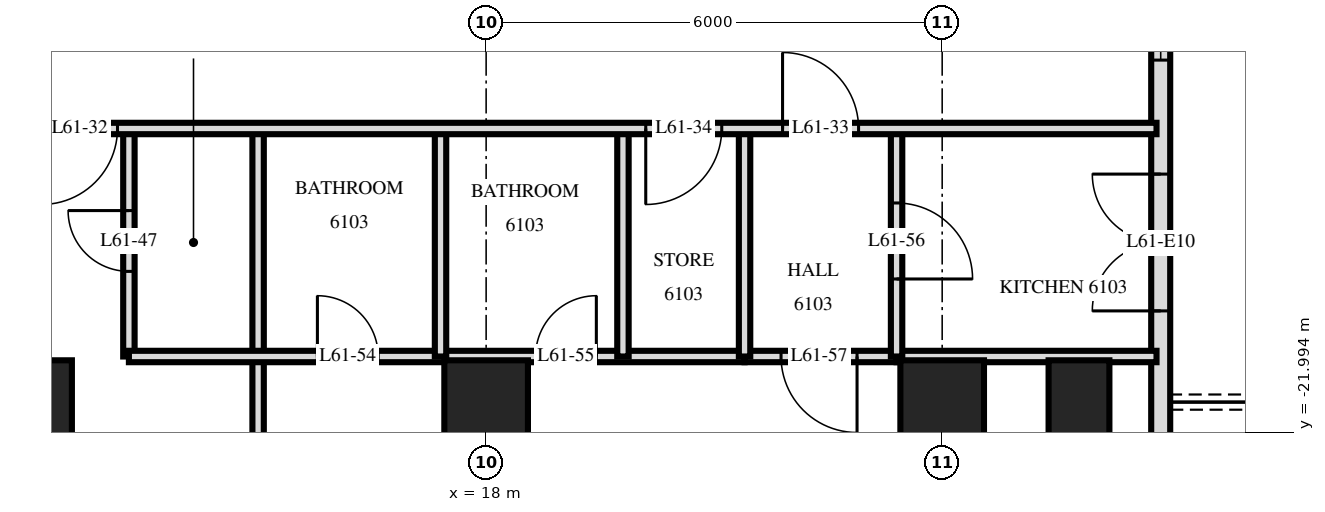
"""IFC4 building model, lengths in metres.
Left out: names, types, materials, properties, quantities, classifications, styles, units other than length and angle.
Written with IfcOpenShell. Run it as: python <this file> out.ifc"""

import sys

from ifc_helpers import new_model, si_unit, direction, frame, frame_2d, origin, origin_2d, place, context, subcontext, project, spatial, rectangle, extrude, element, fill, save


model = new_model("IFC4")
c1 = context("Model", 3, precision=1e-05, world=origin(), true_north=direction((0.0, 1.0)))
c2 = subcontext(c1, "Body", "Model", "MODEL_VIEW")
j1 = project(units=[si_unit("LENGTHUNIT", "METRE"), si_unit("PLANEANGLEUNIT", "RADIAN")], contexts=[c1])
p1 = place(None, origin())
s1 = spatial("IfcSite", under=j1, at=p1, CompositionType="ELEMENT")
p2 = place(p1, origin())
s2 = spatial("IfcBuilding", under=s1, at=p2, CompositionType="ELEMENT")
p3 = place(p2, frame((0.0, 0.0, 232.6)))
s3 = spatial("IfcBuildingStorey", under=s2, at=p3, CompositionType="ELEMENT", Elevation=232.6)
for number, where, z_axis, x_axis in (
    (1, (12.0, -21.6, 0.0), (0.0, 0.0, 1.0), (1.0, 0.0, 0.0)),
    (2, (18.0, -21.6, 0.0), (0.0, 0.0, 1.0), (1.0, 0.0, 0.0)),
    (3, (24.0, -21.6, 0.0), (0.0, 0.0, 1.0), (1.0, 0.0, 0.0)),
):
    element("IfcColumn", number, at=place(p3, frame(where, z_axis=z_axis, x_axis=x_axis)), inside=s3, PredefinedType="COLUMN", context=c2, shape_type="SweptSolid", body=[
        extrude(rectangle(XDim=1.1, YDim=1.1, at=origin_2d()), origin(), (0.0, 0.0, 1.0), 3.5),
    ])
p4 = place(p3, frame((25.8, -21.6, 0.0), z_axis=(0.0, 0.0, 1.0), x_axis=(0.0, 1.0, 0.0)))
e4 = element("IfcColumn", 4, at=p4, inside=s3, PredefinedType="COLUMN", context=c2, shape_type="SweptSolid", body=[
    extrude(rectangle(XDim=1.1, YDim=0.8, at=origin_2d()), origin(), (0.0, 0.0, 1.0), 3.5),
])
p5 = place(p3, frame((26.875, -24.875, 0.0), z_axis=(0.0, 0.0, 1.0), x_axis=(0.0, 1.0, 0.0)))
e5 = element("IfcWall", 5, at=p5, inside=s3, PredefinedType="SOLIDWALL", context=c2, shape_type="SweptSolid", body=[
    extrude(rectangle(XDim=21.551, YDim=0.25, at=frame_2d((10.775, 0.0))), origin(), (0.0, 0.0, 1.0), 3.22),
])
p6 = place(p5, frame((0.575, 0.0, 0.0)))
e6 = element("IfcOpeningElement", 6, at=p6, cuts=e5, PredefinedType="OPENING", context=c2, shape_type="SweptSolid", body=[
    extrude(rectangle(XDim=1.8, YDim=2.4, at=frame_2d((0.9, 1.2))), frame((0.0, 0.135, 0.0), z_axis=(0.0, -1.0, 0.0), x_axis=(1.0, 0.0, 0.0)), (0.0, 0.0, 1.0), 0.27),
])
p7 = place(p5, frame((4.475, 0.0, 0.0)))
e7 = element("IfcOpeningElement", 7, at=p7, cuts=e5, PredefinedType="OPENING", context=c2, shape_type="SweptSolid", body=[
    extrude(rectangle(XDim=1.8, YDim=2.4, at=frame_2d((0.9, 1.2))), frame((0.0, 0.135, 0.0), z_axis=(0.0, -1.0, 0.0), x_axis=(1.0, 0.0, 0.0)), (0.0, 0.0, 1.0), 0.27),
])
p8 = place(p5, frame((7.775, 0.0, 0.9)))
e8 = element("IfcOpeningElement", 8, at=p8, cuts=e5, PredefinedType="OPENING", context=c2, shape_type="SweptSolid", body=[
    extrude(rectangle(XDim=1.2, YDim=1.5, at=frame_2d((0.6, 0.75))), frame((0.0, 0.135, 0.0), z_axis=(0.0, -1.0, 0.0), x_axis=(1.0, 0.0, 0.0)), (0.0, 0.0, 1.0), 0.27),
])
p9 = place(p5, frame((13.1, 0.0, 0.0)))
e9 = element("IfcOpeningElement", 9, at=p9, cuts=e5, PredefinedType="OPENING", context=c2, shape_type="SweptSolid", body=[
    extrude(rectangle(XDim=1.8, YDim=2.4, at=frame_2d((0.9, 1.2))), frame((0.0, 0.135, 0.0), z_axis=(0.0, -1.0, 0.0), x_axis=(1.0, 0.0, 0.0)), (0.0, 0.0, 1.0), 0.27),
])
p10 = place(p3, frame((24.0, -28.918, 0.0), z_axis=(0.0, 0.0, 1.0), x_axis=(0.0, 1.0, 0.0)))
e10 = element("IfcWall", 10, at=p10, inside=s3, PredefinedType="PARTITIONING", context=c2, shape_type="SweptSolid", body=[
    extrude(rectangle(XDim=7.918, YDim=0.15, at=frame_2d((3.959, 0.0))), origin(), (0.0, 0.0, 1.0), 3.22),
])
p11 = place(p10, frame((3.398, 0.0, 0.0)))
e11 = element("IfcOpeningElement", 11, at=p11, cuts=e10, PredefinedType="OPENING", context=c2, shape_type="SweptSolid", body=[
    extrude(rectangle(XDim=0.9, YDim=2.1, at=frame_2d((0.45, 1.05))), frame((0.0, 0.085, 0.0), z_axis=(0.0, -1.0, 0.0), x_axis=(1.0, 0.0, 0.0)), (0.0, 0.0, 1.0), 0.17),
])
p12 = place(p3, frame((23.4, -21.0, 0.0), z_axis=(0.0, 0.0, 1.0), x_axis=(0.0, 1.0, 0.0)))
e12 = element("IfcWall", 12, at=p12, inside=s3, PredefinedType="PARTITIONING", context=c2, shape_type="SweptSolid", body=[
    extrude(rectangle(XDim=3.0, YDim=0.15, at=frame_2d((1.5, 0.0))), origin(), (0.0, 0.0, 1.0), 3.22),
])
p13 = place(p12, frame((1.02, 0.0, 0.0)))
e13 = element("IfcOpeningElement", 13, at=p13, cuts=e12, PredefinedType="OPENING", context=c2, shape_type="SweptSolid", body=[
    extrude(rectangle(XDim=1.0, YDim=2.1, at=frame_2d((0.5, 1.05))), frame((0.0, 0.085, 0.0), z_axis=(0.0, -1.0, 0.0), x_axis=(1.0, 0.0, 0.0)), (0.0, 0.0, 1.0), 0.17),
])
for number, where, z_axis, x_axis in (
    (14, (21.4, -21.0, 0.0), (0.0, 0.0, 1.0), (0.0, 1.0, 0.0)),
    (15, (19.8, -21.0, 0.0), (0.0, 0.0, 1.0), (0.0, 1.0, 0.0)),
):
    element("IfcWall", number, at=place(p3, frame(where, z_axis=z_axis, x_axis=x_axis)), inside=s3, PredefinedType="PARTITIONING", context=c2, shape_type="SweptSolid", body=[
        extrude(rectangle(XDim=3.0, YDim=0.15, at=frame_2d((1.5, 0.0))), origin(), (0.0, 0.0, 1.0), 3.22),
    ])
p14 = place(p3, frame((18.0, -29.22, 0.0), z_axis=(0.0, 0.0, 1.0), x_axis=(0.0, 1.0, 0.0)))
e16 = element("IfcWall", 16, at=p14, inside=s3, PredefinedType="PARTITIONING", context=c2, shape_type="SweptSolid", body=[
    extrude(rectangle(XDim=8.22, YDim=0.15, at=frame_2d((4.11, 0.0))), origin(), (0.0, 0.0, 1.0), 3.22),
])
p15 = place(p14, frame((3.59, 0.0, 0.0)))
e17 = element("IfcOpeningElement", 17, at=p15, cuts=e16, PredefinedType="OPENING", context=c2, shape_type="SweptSolid", body=[
    extrude(rectangle(XDim=0.9, YDim=2.1, at=frame_2d((0.45, 1.05))), frame((0.0, 0.085, 0.0), z_axis=(0.0, -1.0, 0.0), x_axis=(1.0, 0.0, 0.0)), (0.0, 0.0, 1.0), 0.17),
])
p16 = place(p3, frame((17.4, -21.0, 0.0), z_axis=(0.0, 0.0, 1.0), x_axis=(0.0, 1.0, 0.0)))
e18 = element("IfcWall", 18, at=p16, inside=s3, PredefinedType="PARTITIONING", context=c2, shape_type="SweptSolid", body=[
    extrude(rectangle(XDim=3.0, YDim=0.15, at=frame_2d((1.5, 0.0))), origin(), (0.0, 0.0, 1.0), 3.22),
])
p17 = place(p3, frame((15.0, -29.22, 0.0), z_axis=(0.0, 0.0, 1.0), x_axis=(0.0, 1.0, 0.0)))
e19 = element("IfcWall", 19, at=p17, inside=s3, PredefinedType="PARTITIONING", context=c2, shape_type="SweptSolid", body=[
    extrude(rectangle(XDim=11.22, YDim=0.15, at=frame_2d((5.61, 0.0))), origin(), (0.0, 0.0, 1.0), 3.22),
])
p18 = place(p3, frame((13.3, -21.0, 0.0), z_axis=(0.0, 0.0, 1.0), x_axis=(0.0, 1.0, 0.0)))
e20 = element("IfcWall", 20, at=p18, inside=s3, PredefinedType="PARTITIONING", context=c2, shape_type="SweptSolid", body=[
    extrude(rectangle(XDim=3.0, YDim=0.15, at=frame_2d((1.5, 0.0))), origin(), (0.0, 0.0, 1.0), 3.22),
])
p19 = place(p18, frame((1.12, 0.0, 0.0)))
e21 = element("IfcOpeningElement", 21, at=p19, cuts=e20, PredefinedType="OPENING", context=c2, shape_type="SweptSolid", body=[
    extrude(rectangle(XDim=0.8, YDim=2.1, at=frame_2d((0.4, 1.05))), frame((0.0, 0.085, 0.0), z_axis=(0.0, -1.0, 0.0), x_axis=(1.0, 0.0, 0.0)), (0.0, 0.0, 1.0), 0.17),
])
p20 = place(p3, frame((21.4, -21.0, 0.0), z_axis=(0.0, 0.0, 1.0), x_axis=(1.0, 0.0, 0.0)))
e22 = element("IfcWall", 22, at=p20, inside=s3, PredefinedType="PARTITIONING", context=c2, shape_type="SweptSolid", body=[
    extrude(rectangle(XDim=2.0, YDim=0.15, at=frame_2d((1.0, 0.0))), origin(), (0.0, 0.0, 1.0), 3.22),
])
p21 = place(p20, frame((0.48, 0.0, 0.0)))
e23 = element("IfcOpeningElement", 23, at=p21, cuts=e22, PredefinedType="OPENING", context=c2, shape_type="SweptSolid", body=[
    extrude(rectangle(XDim=1.0, YDim=2.1, at=frame_2d((0.5, 1.05))), frame((0.0, 0.085, 0.0), z_axis=(0.0, -1.0, 0.0), x_axis=(1.0, 0.0, 0.0)), (0.0, 0.0, 1.0), 0.17),
])
p22 = place(p3, frame((13.3, -21.0, 0.0), z_axis=(0.0, 0.0, 1.0), x_axis=(1.0, 0.0, 0.0)))
e24 = element("IfcWall", 24, at=p22, inside=s3, PredefinedType="PARTITIONING", context=c2, shape_type="SweptSolid", body=[
    extrude(rectangle(XDim=8.1, YDim=0.15, at=frame_2d((4.05, 0.0))), origin(), (0.0, 0.0, 1.0), 3.22),
])
p23 = place(p22, frame((2.48, 0.0, 0.0)))
e25 = element("IfcOpeningElement", 25, at=p23, cuts=e24, PredefinedType="OPENING", context=c2, shape_type="SweptSolid", body=[
    extrude(rectangle(XDim=0.8, YDim=2.1, at=frame_2d((0.4, 1.05))), frame((0.0, 0.085, 0.0), z_axis=(0.0, -1.0, 0.0), x_axis=(1.0, 0.0, 0.0)), (0.0, 0.0, 1.0), 0.17),
])
p24 = place(p22, frame((5.35, 0.0, 0.0)))
e26 = element("IfcOpeningElement", 26, at=p24, cuts=e24, PredefinedType="OPENING", context=c2, shape_type="SweptSolid", body=[
    extrude(rectangle(XDim=0.8, YDim=2.1, at=frame_2d((0.4, 1.05))), frame((0.0, 0.085, 0.0), z_axis=(0.0, -1.0, 0.0), x_axis=(1.0, 0.0, 0.0)), (0.0, 0.0, 1.0), 0.17),
])
p25 = place(p3, frame((23.4, -21.0, 0.0), z_axis=(0.0, 0.0, 1.0), x_axis=(1.0, 0.0, 0.0)))
e27 = element("IfcWall", 27, at=p25, inside=s3, PredefinedType="PARTITIONING", context=c2, shape_type="SweptSolid", body=[
    extrude(rectangle(XDim=3.42, YDim=0.15, at=frame_2d((1.71, 0.0))), origin(), (0.0, 0.0, 1.0), 3.22),
])
p26 = place(p3, frame((-26.82, -18.0, 0.0), z_axis=(0.0, 0.0, 1.0), x_axis=(1.0, 0.0, 0.0)))
e28 = element("IfcWall", 28, at=p26, inside=s3, PredefinedType="PARTITIONING", context=c2, shape_type="SweptSolid", body=[
    extrude(rectangle(XDim=53.64, YDim=0.15, at=frame_2d((26.82, 0.0))), origin(), (0.0, 0.0, 1.0), 3.22),
])
p27 = place(p26, frame((4.92, 0.0, 0.0)))
e29 = element("IfcOpeningElement", 29, at=p27, cuts=e28, PredefinedType="OPENING", context=c2, shape_type="SweptSolid", body=[
    extrude(rectangle(XDim=1.0, YDim=2.1, at=frame_2d((0.5, 1.05))), frame((0.0, 0.085, 0.0), z_axis=(0.0, -1.0, 0.0), x_axis=(1.0, 0.0, 0.0)), (0.0, 0.0, 1.0), 0.17),
])
p28 = place(p26, frame((1.62, 0.0, 0.0)))
e30 = element("IfcOpeningElement", 30, at=p28, cuts=e28, PredefinedType="OPENING", context=c2, shape_type="SweptSolid", body=[
    extrude(rectangle(XDim=1.0, YDim=2.1, at=frame_2d((0.5, 1.05))), frame((0.0, 0.085, 0.0), z_axis=(0.0, -1.0, 0.0), x_axis=(1.0, 0.0, 0.0)), (0.0, 0.0, 1.0), 0.17),
])
p29 = place(p26, frame((38.97, 0.0, 0.0)))
e31 = element("IfcOpeningElement", 31, at=p29, cuts=e28, PredefinedType="OPENING", context=c2, shape_type="SweptSolid", body=[
    extrude(rectangle(XDim=1.0, YDim=2.1, at=frame_2d((0.5, 1.05))), frame((0.0, 0.085, 0.0), z_axis=(0.0, -1.0, 0.0), x_axis=(1.0, 0.0, 0.0)), (0.0, 0.0, 1.0), 0.17),
])
p30 = place(p26, frame((48.72, 0.0, 0.0)))
e32 = element("IfcOpeningElement", 32, at=p30, cuts=e28, PredefinedType="OPENING", context=c2, shape_type="SweptSolid", body=[
    extrude(rectangle(XDim=1.0, YDim=2.1, at=frame_2d((0.5, 1.05))), frame((0.0, 0.085, 0.0), z_axis=(0.0, -1.0, 0.0), x_axis=(1.0, 0.0, 0.0)), (0.0, 0.0, 1.0), 0.17),
])
p31 = place(p26, frame((46.92, 0.0, 0.0)))
e33 = element("IfcOpeningElement", 33, at=p31, cuts=e28, PredefinedType="OPENING", context=c2, shape_type="SweptSolid", body=[
    extrude(rectangle(XDim=1.0, YDim=2.1, at=frame_2d((0.5, 1.05))), frame((0.0, 0.085, 0.0), z_axis=(0.0, -1.0, 0.0), x_axis=(1.0, 0.0, 0.0)), (0.0, 0.0, 1.0), 0.17),
])
p32 = place(p26, frame((18.82, 0.0, 0.0)))
e34 = element("IfcOpeningElement", 34, at=p32, cuts=e28, PredefinedType="OPENING", context=c2, shape_type="SweptSolid", body=[
    extrude(rectangle(XDim=1.0, YDim=2.1, at=frame_2d((0.5, 1.05))), frame((0.0, 0.085, 0.0), z_axis=(0.0, -1.0, 0.0), x_axis=(1.0, 0.0, 0.0)), (0.0, 0.0, 1.0), 0.17),
])
p33 = place(p26, frame((27.82, 0.0, 0.0)))
e35 = element("IfcOpeningElement", 35, at=p33, cuts=e28, PredefinedType="OPENING", context=c2, shape_type="SweptSolid", body=[
    extrude(rectangle(XDim=1.0, YDim=2.1, at=frame_2d((0.5, 1.05))), frame((0.0, 0.085, 0.0), z_axis=(0.0, -1.0, 0.0), x_axis=(1.0, 0.0, 0.0)), (0.0, 0.0, 1.0), 0.17),
])
p34 = place(p26, frame((35.32, 0.0, 0.0)))
e36 = element("IfcOpeningElement", 36, at=p34, cuts=e28, PredefinedType="OPENING", context=c2, shape_type="SweptSolid", body=[
    extrude(rectangle(XDim=1.0, YDim=2.1, at=frame_2d((0.5, 1.05))), frame((0.0, 0.085, 0.0), z_axis=(0.0, -1.0, 0.0), x_axis=(1.0, 0.0, 0.0)), (0.0, 0.0, 1.0), 0.17),
])
p35 = place(p7, origin())
e37 = element("IfcDoor", 37, at=p35, inside=s3, OperationType="DOUBLE_DOOR_SINGLE_SWING", PredefinedType="DOOR", context=c2, shape_type="SweptSolid", body=[
    extrude(rectangle(XDim=1.8, YDim=2.4, at=frame_2d((0.9, 1.2))), frame((0.0, 0.025, 0.0), z_axis=(0.0, -1.0, 0.0), x_axis=(1.0, 0.0, 0.0)), (0.0, 0.0, 1.0), 0.05),
])
fill(e7, e37)
p36 = place(p8, origin())
e38 = element("IfcWindow", 38, at=p36, inside=s3, PartitioningType="SINGLE_PANEL", PredefinedType="WINDOW", context=c2, shape_type="SweptSolid", body=[
    extrude(rectangle(XDim=1.2, YDim=1.5, at=frame_2d((0.6, 0.75))), frame((0.0, 0.03, 0.0), z_axis=(0.0, -1.0, 0.0), x_axis=(1.0, 0.0, 0.0)), (0.0, 0.0, 1.0), 0.06),
])
fill(e8, e38)
p37 = place(p29, frame((0.5, 0.0, 0.0), z_axis=(0.0, 0.0, 1.0), x_axis=(-1.0, 0.0, 0.0)))
e39 = element("IfcDoor", 39, at=p37, inside=s3, OperationType="SINGLE_SWING_LEFT", PredefinedType="DOOR", context=c2, shape_type="SweptSolid", body=[
    extrude(rectangle(XDim=1.0, YDim=2.1, at=frame_2d((0.0, 1.05))), frame((0.0, -0.025, 0.0), z_axis=(0.0, 1.0, 0.0), x_axis=(-1.0, 0.0, 0.0)), (0.0, 0.0, 1.0), 0.05),
])
fill(e31, e39)
p38 = place(p30, origin())
e40 = element("IfcDoor", 40, at=p38, inside=s3, OperationType="SINGLE_SWING_RIGHT", PredefinedType="DOOR", context=c2, shape_type="SweptSolid", body=[
    extrude(rectangle(XDim=1.0, YDim=2.1, at=frame_2d((0.5, 1.05))), frame((0.0, 0.025, 0.0), z_axis=(0.0, -1.0, 0.0), x_axis=(1.0, 0.0, 0.0)), (0.0, 0.0, 1.0), 0.05),
])
fill(e32, e40)
p39 = place(p31, frame((0.5, 0.0, 0.0), z_axis=(0.0, 0.0, 1.0), x_axis=(-1.0, 0.0, 0.0)))
e41 = element("IfcDoor", 41, at=p39, inside=s3, OperationType="SINGLE_SWING_LEFT", PredefinedType="DOOR", context=c2, shape_type="SweptSolid", body=[
    extrude(rectangle(XDim=1.0, YDim=2.1, at=frame_2d((0.0, 1.05))), frame((0.0, -0.025, 0.0), z_axis=(0.0, 1.0, 0.0), x_axis=(-1.0, 0.0, 0.0)), (0.0, 0.0, 1.0), 0.05),
])
fill(e33, e41)
p40 = place(p19, origin())
e42 = element("IfcDoor", 42, at=p40, inside=s3, OperationType="SINGLE_SWING_LEFT", PredefinedType="DOOR", context=c2, shape_type="SweptSolid", body=[
    extrude(rectangle(XDim=0.8, YDim=2.1, at=frame_2d((0.4, 1.05))), frame((0.0, 0.025, 0.0), z_axis=(0.0, -1.0, 0.0), x_axis=(1.0, 0.0, 0.0)), (0.0, 0.0, 1.0), 0.05),
])
fill(e21, e42)
p41 = place(p23, origin())
e43 = element("IfcDoor", 43, at=p41, inside=s3, OperationType="SINGLE_SWING_RIGHT", PredefinedType="DOOR", context=c2, shape_type="SweptSolid", body=[
    extrude(rectangle(XDim=0.8, YDim=2.1, at=frame_2d((0.4, 1.05))), frame((0.0, 0.025, 0.0), z_axis=(0.0, -1.0, 0.0), x_axis=(1.0, 0.0, 0.0)), (0.0, 0.0, 1.0), 0.05),
])
fill(e25, e43)
p42 = place(p24, origin())
e44 = element("IfcDoor", 44, at=p42, inside=s3, OperationType="SINGLE_SWING_LEFT", PredefinedType="DOOR", context=c2, shape_type="SweptSolid", body=[
    extrude(rectangle(XDim=0.8, YDim=2.1, at=frame_2d((0.4, 1.05))), frame((0.0, 0.025, 0.0), z_axis=(0.0, -1.0, 0.0), x_axis=(1.0, 0.0, 0.0)), (0.0, 0.0, 1.0), 0.05),
])
fill(e26, e44)
p43 = place(p13, frame((0.5, 0.0, 0.0), z_axis=(0.0, 0.0, 1.0), x_axis=(-1.0, 0.0, 0.0)))
e45 = element("IfcDoor", 45, at=p43, inside=s3, OperationType="SINGLE_SWING_LEFT", PredefinedType="DOOR", context=c2, shape_type="SweptSolid", body=[
    extrude(rectangle(XDim=1.0, YDim=2.1, at=frame_2d((0.0, 1.05))), frame((0.0, -0.025, 0.0), z_axis=(0.0, 1.0, 0.0), x_axis=(-1.0, 0.0, 0.0)), (0.0, 0.0, 1.0), 0.05),
])
fill(e13, e45)
p44 = place(p21, frame((0.5, 0.0, 0.0), z_axis=(0.0, 0.0, 1.0), x_axis=(-1.0, 0.0, 0.0)))
e46 = element("IfcDoor", 46, at=p44, inside=s3, OperationType="SINGLE_SWING_RIGHT", PredefinedType="DOOR", context=c2, shape_type="SweptSolid", body=[
    extrude(rectangle(XDim=1.0, YDim=2.1, at=frame_2d((0.0, 1.05))), frame((0.0, -0.025, 0.0), z_axis=(0.0, 1.0, 0.0), x_axis=(-1.0, 0.0, 0.0)), (0.0, 0.0, 1.0), 0.05),
])
fill(e23, e46)
save(model, sys.argv[1])
